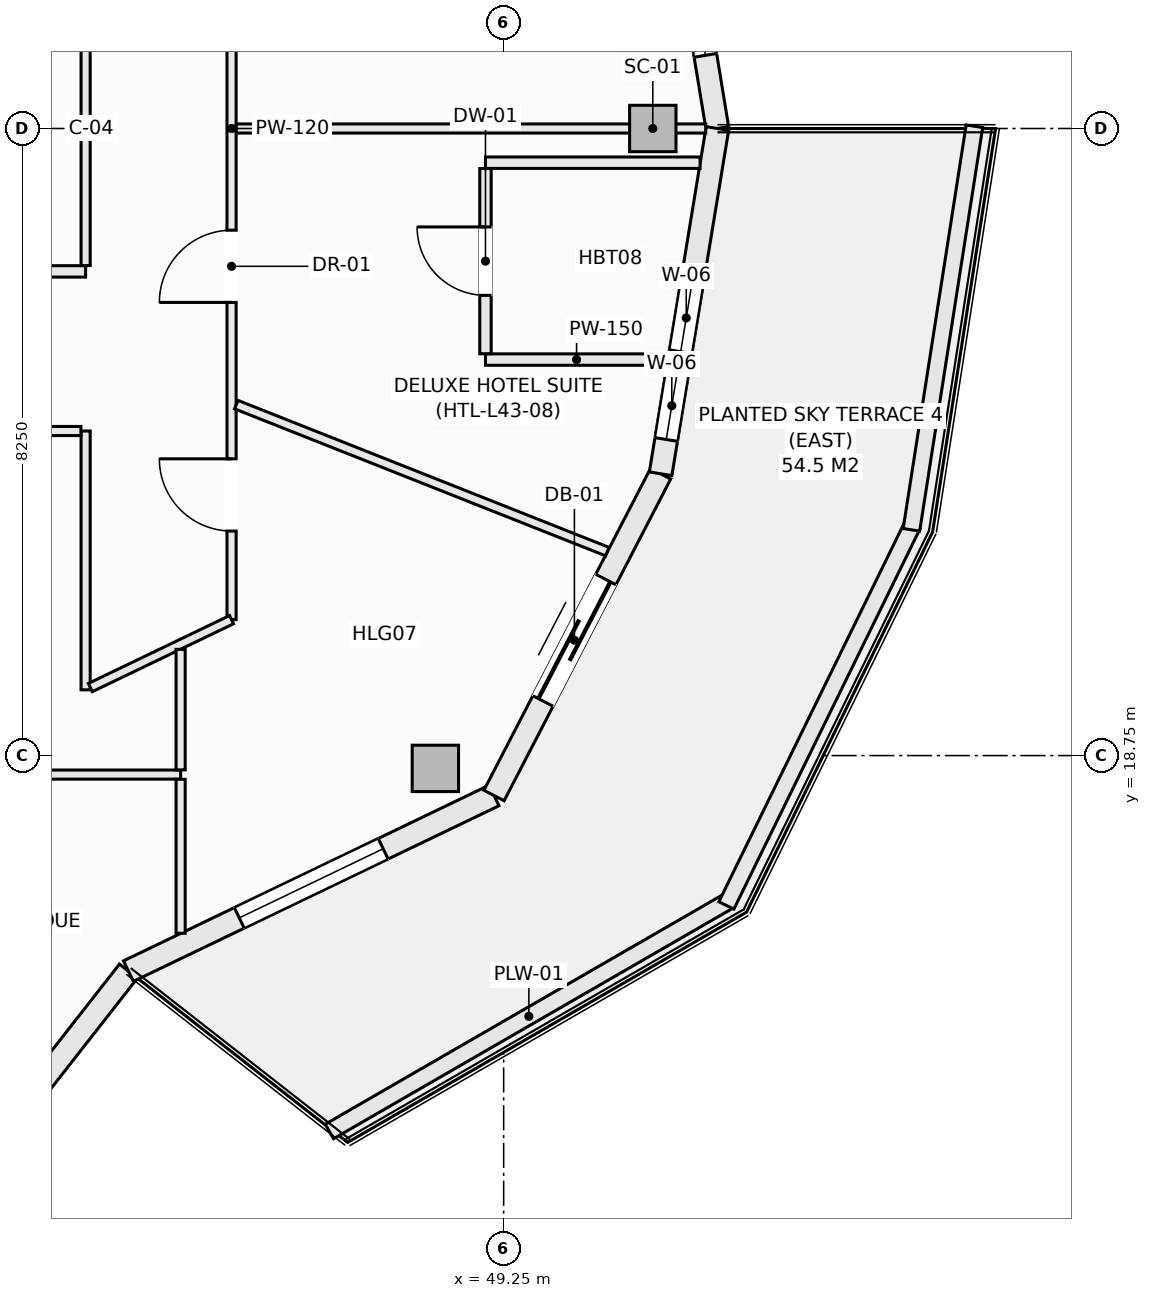
"""IFC4 building model, lengths in metres.
Left out: names, types, materials, properties, quantities, classifications, styles, units other than length and angle.
Written with IfcOpenShell. Run it as: python <this file> out.ifc"""

import sys

from ifc_helpers import new_model, si_unit, direction, frame, frame_2d, origin, origin_2d, place, context, subcontext, project, spatial, rectangle, hollow_rectangle, extrude, element, fill, save


model = new_model("IFC4")
c1 = context("Model", 3, precision=1e-05, world=origin(), true_north=direction((0.0, 1.0)))
c2 = subcontext(c1, "Body", "Model", "MODEL_VIEW")
j1 = project(units=[si_unit("LENGTHUNIT", "METRE"), si_unit("PLANEANGLEUNIT", "RADIAN")], contexts=[c1])
p1 = place(None, origin())
s1 = spatial("IfcSite", under=j1, at=p1, CompositionType="ELEMENT")
p2 = place(p1, origin())
s2 = spatial("IfcBuilding", under=s1, at=p2, CompositionType="ELEMENT")
p3 = place(p2, frame((0.0, 0.0, 166.5)))
s3 = spatial("IfcBuildingStorey", under=s2, at=p3, CompositionType="ELEMENT", Elevation=166.5)
for number, where, z_axis, x_axis in (
    (1, (51.212, 27.0, -0.27), (0.0, 0.0, 1.0), (1.0, 0.0, 0.0)),
    (2, (48.352, 18.581, -0.27), (0.0, 0.0, 1.0), (1.0, 0.0, 0.0)),
):
    element("IfcColumn", number, at=place(p3, frame(where, z_axis=z_axis, x_axis=x_axis)), inside=s3, PredefinedType="COLUMN", context=c2, shape_type="SweptSolid", body=[
        extrude(hollow_rectangle(XDim=0.61, YDim=0.61, WallThickness=0.025, at=origin_2d()), origin(), (0.0, 0.0, 1.0), 3.4),
    ])
p4 = place(p3, frame((51.315, 31.542, 0.0), z_axis=(0.0, 0.0, 1.0), x_axis=(0.162394765401, -0.986725868806, 0.0)))
e3 = element("IfcWall", 3, at=p4, inside=s3, PredefinedType="SOLIDWALL", context=c2, shape_type="SweptSolid", body=[
    extrude(rectangle(XDim=4.603, YDim=0.3, at=frame_2d((2.302, 0.0))), origin(), (0.0, 0.0, 1.0), 2.653),
])
p5 = place(p4, frame((0.958, 0.0, 0.74)))
e4 = element("IfcOpeningElement", 4, at=p5, cuts=e3, PredefinedType="OPENING", context=c2, shape_type="SweptSolid", body=[
    extrude(rectangle(XDim=1.2, YDim=1.7, at=frame_2d((0.6, 0.85))), frame((0.0, 0.16, 0.0), z_axis=(0.0, -1.0, 0.0), x_axis=(1.0, 0.0, 0.0)), (0.0, 0.0, 1.0), 0.32),
])
p6 = place(p4, frame((2.428, 0.0, 0.74)))
e5 = element("IfcOpeningElement", 5, at=p6, cuts=e3, PredefinedType="OPENING", context=c2, shape_type="SweptSolid", body=[
    extrude(rectangle(XDim=1.2, YDim=1.7, at=frame_2d((0.6, 0.85))), frame((0.0, 0.16, 0.0), z_axis=(0.0, -1.0, 0.0), x_axis=(1.0, 0.0, 0.0)), (0.0, 0.0, 1.0), 0.32),
])
p7 = place(p3, frame((41.094, 11.801, 0.0), z_axis=(0.0, 0.0, 1.0), x_axis=(0.616429245738, 0.787410302828, 0.0)))
e6 = element("IfcWall", 6, at=p7, inside=s3, PredefinedType="SOLIDWALL", context=c2, shape_type="SweptSolid", body=[
    extrude(rectangle(XDim=5.223, YDim=0.3, at=frame_2d((2.612, 0.0))), origin(), (0.0, 0.0, 1.0), 2.653),
])
p8 = place(p7, frame((1.38, 0.0, 0.72)))
e7 = element("IfcOpeningElement", 7, at=p8, cuts=e6, PredefinedType="OPENING", context=c2, shape_type="SweptSolid", body=[
    extrude(rectangle(XDim=1.2, YDim=1.65, at=frame_2d((0.6, 0.825))), frame((0.0, 0.16, 0.0), z_axis=(0.0, -1.0, 0.0), x_axis=(1.0, 0.0, 0.0)), (0.0, 0.0, 1.0), 0.32),
])
p9 = place(p3, frame((44.313, 15.914, 0.0), z_axis=(0.0, 0.0, 1.0), x_axis=(0.901353070301, 0.433085029363, 0.0)))
e8 = element("IfcWall", 8, at=p9, inside=s3, PredefinedType="SOLIDWALL", context=c2, shape_type="SweptSolid", body=[
    extrude(rectangle(XDim=5.336, YDim=0.3, at=frame_2d((2.668, 0.0))), origin(), (0.0, 0.0, 1.0), 2.653),
])
p10 = place(p9, frame((1.618, 0.0, 0.74)))
e9 = element("IfcOpeningElement", 9, at=p10, cuts=e8, PredefinedType="OPENING", context=c2, shape_type="SweptSolid", body=[
    extrude(rectangle(XDim=2.1, YDim=1.7, at=frame_2d((1.05, 0.85))), frame((0.0, 0.16, 0.0), z_axis=(0.0, -1.0, 0.0), x_axis=(1.0, 0.0, 0.0)), (0.0, 0.0, 1.0), 0.32),
])
p11 = place(p3, frame((49.123, 18.225, 0.0), z_axis=(0.0, 0.0, 1.0), x_axis=(0.459810251451, 0.888017191647, 0.0)))
e10 = element("IfcWall", 10, at=p11, inside=s3, PredefinedType="SOLIDWALL", context=c2, shape_type="SweptSolid", body=[
    extrude(rectangle(XDim=4.766, YDim=0.3, at=frame_2d((2.383, 0.0))), origin(), (0.0, 0.0, 1.0), 2.653),
])
p12 = place(p11, frame((1.4, 0.0, 0.0)))
e11 = element("IfcOpeningElement", 11, at=p12, cuts=e10, PredefinedType="OPENING", context=c2, shape_type="SweptSolid", body=[
    extrude(rectangle(XDim=1.8, YDim=2.25, at=frame_2d((0.9, 1.125))), frame((0.0, 0.16, 0.0), z_axis=(0.0, -1.0, 0.0), x_axis=(1.0, 0.0, 0.0)), (0.0, 0.0, 1.0), 0.32),
])
p13 = place(p3, frame((51.315, 22.458, 0.0), z_axis=(0.0, 0.0, 1.0), x_axis=(0.162394765401, 0.986725868806, 0.0)))
e12 = element("IfcWall", 12, at=p13, inside=s3, PredefinedType="SOLIDWALL", context=c2, shape_type="SweptSolid", body=[
    extrude(rectangle(XDim=4.603, YDim=0.3, at=frame_2d((2.302, 0.0))), origin(), (0.0, 0.0, 1.0), 2.653),
])
p14 = place(p13, frame((0.457, 0.0, 0.72)))
e13 = element("IfcOpeningElement", 13, at=p14, cuts=e12, PredefinedType="OPENING", context=c2, shape_type="SweptSolid", body=[
    extrude(rectangle(XDim=0.9, YDim=1.65, at=frame_2d((0.45, 0.825))), frame((0.0, 0.16, 0.0), z_axis=(0.0, -1.0, 0.0), x_axis=(1.0, 0.0, 0.0)), (0.0, 0.0, 1.0), 0.32),
])
p15 = place(p13, frame((1.627, 0.0, 0.72)))
e14 = element("IfcOpeningElement", 14, at=p15, cuts=e12, PredefinedType="OPENING", context=c2, shape_type="SweptSolid", body=[
    extrude(rectangle(XDim=0.9, YDim=1.65, at=frame_2d((0.45, 0.825))), frame((0.0, 0.16, 0.0), z_axis=(0.0, -1.0, 0.0), x_axis=(1.0, 0.0, 0.0)), (0.0, 0.0, 1.0), 0.32),
])
p16 = place(p3, frame((46.958, 13.805, 0.0), z_axis=(0.0, 0.0, 1.0), x_axis=(0.866058128659, 0.499943314571, 0.0)))
e15 = element("IfcWall", 15, at=p16, inside=s3, PredefinedType="PARAPET", context=c2, shape_type="SweptSolid", body=[
    extrude(rectangle(XDim=6.06, YDim=0.22, at=frame_2d((3.03, 0.0))), origin(), (0.0, 0.0, 1.0), 0.52),
])
p17 = place(p3, frame((52.18, 16.779, 0.0), z_axis=(0.0, 0.0, 1.0), x_axis=(0.439637174641, 0.898175458735, 0.0)))
e16 = element("IfcWall", 16, at=p17, inside=s3, PredefinedType="PARAPET", context=c2, shape_type="SweptSolid", body=[
    extrude(rectangle(XDim=5.567, YDim=0.22, at=frame_2d((2.784, 0.0))), origin(), (0.0, 0.0, 1.0), 0.52),
])
p18 = place(p3, frame((54.615, 21.72, 0.0), z_axis=(0.0, 0.0, 1.0), x_axis=(0.154245214003, 0.988032597619, 0.0)))
e17 = element("IfcWall", 17, at=p18, inside=s3, PredefinedType="PARAPET", context=c2, shape_type="SweptSolid", body=[
    extrude(rectangle(XDim=5.374, YDim=0.22, at=frame_2d((2.687, 0.0))), origin(), (0.0, 0.0, 1.0), 0.52),
])
p19 = place(p3, frame((49.011, 23.96, 0.0), z_axis=(0.0, 0.0, 1.0), x_axis=(1.0, 0.0, 0.0)))
e18 = element("IfcWall", 18, at=p19, inside=s3, PredefinedType="PARTITIONING", context=c2, shape_type="SweptSolid", body=[
    extrude(rectangle(XDim=2.397, YDim=0.15, at=frame_2d((1.199, 0.0))), origin(), (0.0, 0.0, 1.0), 3.13),
])
p20 = place(p3, frame((29.78, 25.12, 0.0), z_axis=(0.0, 0.0, 1.0), x_axis=(1.0, 0.0, 0.0)))
e19 = element("IfcWall", 19, at=p20, inside=s3, PredefinedType="PARTITIONING", context=c2, shape_type="SweptSolid", body=[
    extrude(rectangle(XDim=13.97, YDim=0.15, at=frame_2d((6.985, 0.0))), origin(), (0.0, 0.0, 1.0), 3.13),
])
p21 = place(p20, frame((3.14, 0.0, 0.0)))
e20 = element("IfcOpeningElement", 20, at=p21, cuts=e19, PredefinedType="OPENING", context=c2, shape_type="SweptSolid", body=[
    extrude(rectangle(XDim=0.95, YDim=2.1, at=frame_2d((0.475, 1.05))), frame((0.0, 0.085, 0.0), z_axis=(0.0, -1.0, 0.0), x_axis=(1.0, 0.0, 0.0)), (0.0, 0.0, 1.0), 0.17),
])
p22 = place(p20, frame((7.445, 0.0, 0.0)))
e21 = element("IfcOpeningElement", 21, at=p22, cuts=e19, PredefinedType="OPENING", context=c2, shape_type="SweptSolid", body=[
    extrude(rectangle(XDim=0.95, YDim=2.1, at=frame_2d((0.475, 1.05))), frame((0.0, 0.085, 0.0), z_axis=(0.0, -1.0, 0.0), x_axis=(1.0, 0.0, 0.0)), (0.0, 0.0, 1.0), 0.17),
])
p23 = place(p20, frame((10.815, 0.0, 0.0)))
e22 = element("IfcOpeningElement", 22, at=p23, cuts=e19, PredefinedType="OPENING", context=c2, shape_type="SweptSolid", body=[
    extrude(rectangle(XDim=0.95, YDim=2.1, at=frame_2d((0.475, 1.05))), frame((0.0, 0.085, 0.0), z_axis=(0.0, -1.0, 0.0), x_axis=(1.0, 0.0, 0.0)), (0.0, 0.0, 1.0), 0.17),
])
p24 = place(p3, frame((43.75, 19.615, 0.0), z_axis=(0.0, 0.0, 1.0), x_axis=(0.0, 1.0, 0.0)))
e23 = element("IfcWall", 23, at=p24, inside=s3, PredefinedType="PARTITIONING", context=c2, shape_type="SweptSolid", body=[
    extrude(rectangle(XDim=3.405, YDim=0.12, at=frame_2d((1.703, 0.0))), origin(), (0.0, 0.0, 1.0), 3.13),
])
p25 = place(p3, frame((43.75, 25.197, 0.0), z_axis=(0.0, 0.0, 1.0), x_axis=(0.0, 1.0, 0.0)))
e24 = element("IfcWall", 24, at=p25, inside=s3, PredefinedType="PARTITIONING", context=c2, shape_type="SweptSolid", body=[
    extrude(rectangle(XDim=3.646, YDim=0.12, at=frame_2d((1.823, 0.0))), origin(), (0.0, 0.0, 1.0), 3.13),
])
p26 = place(p3, frame((45.67, 20.538, 0.0), z_axis=(0.0, 0.0, 1.0), x_axis=(0.0, 1.0, 0.0)))
e25 = element("IfcWall", 25, at=p26, inside=s3, PredefinedType="PARTITIONING", context=c2, shape_type="SweptSolid", body=[
    extrude(rectangle(XDim=12.924, YDim=0.12, at=frame_2d((6.462, 0.0))), origin(), (0.0, 0.0, 1.0), 3.13),
])
p27 = place(p26, frame((1.166, 0.0, 0.0)))
e26 = element("IfcOpeningElement", 26, at=p27, cuts=e25, PredefinedType="OPENING", context=c2, shape_type="SweptSolid", body=[
    extrude(rectangle(XDim=0.95, YDim=2.1, at=frame_2d((0.475, 1.05))), frame((0.0, 0.07, 0.0), z_axis=(0.0, -1.0, 0.0), x_axis=(1.0, 0.0, 0.0)), (0.0, 0.0, 1.0), 0.14),
])
p28 = place(p26, frame((4.174, 0.0, 0.0)))
e27 = element("IfcOpeningElement", 27, at=p28, cuts=e25, PredefinedType="OPENING", context=c2, shape_type="SweptSolid", body=[
    extrude(rectangle(XDim=0.95, YDim=2.1, at=frame_2d((0.475, 1.05))), frame((0.0, 0.07, 0.0), z_axis=(0.0, -1.0, 0.0), x_axis=(1.0, 0.0, 0.0)), (0.0, 0.0, 1.0), 0.14),
])
p29 = place(p26, frame((7.8, 0.0, 0.0)))
e28 = element("IfcOpeningElement", 28, at=p29, cuts=e25, PredefinedType="OPENING", context=c2, shape_type="SweptSolid", body=[
    extrude(rectangle(XDim=0.95, YDim=2.1, at=frame_2d((0.475, 1.05))), frame((0.0, 0.07, 0.0), z_axis=(0.0, -1.0, 0.0), x_axis=(1.0, 0.0, 0.0)), (0.0, 0.0, 1.0), 0.14),
])
p30 = place(p26, frame((10.808, 0.0, 0.0)))
e29 = element("IfcOpeningElement", 29, at=p30, cuts=e25, PredefinedType="OPENING", context=c2, shape_type="SweptSolid", body=[
    extrude(rectangle(XDim=0.95, YDim=2.1, at=frame_2d((0.475, 1.05))), frame((0.0, 0.07, 0.0), z_axis=(0.0, -1.0, 0.0), x_axis=(1.0, 0.0, 0.0)), (0.0, 0.0, 1.0), 0.14),
])
p31 = place(p3, frame((43.812, 19.645, 0.0), z_axis=(0.0, 0.0, 1.0), x_axis=(0.901236415331, 0.433327732417, 0.0)))
e30 = element("IfcWall", 30, at=p31, inside=s3, PredefinedType="PARTITIONING", context=c2, shape_type="SweptSolid", body=[
    extrude(rectangle(XDim=2.062, YDim=0.12, at=frame_2d((1.031, 0.0))), origin(), (0.0, 0.0, 1.0), 3.13),
])
p32 = place(p3, frame((39.0, 23.02, 0.0), z_axis=(0.0, 0.0, 1.0), x_axis=(1.0, 0.0, 0.0)))
e31 = element("IfcWall", 31, at=p32, inside=s3, PredefinedType="PARTITIONING", context=c2, shape_type="SweptSolid", body=[
    extrude(rectangle(XDim=4.688, YDim=0.12, at=frame_2d((2.344, 0.0))), origin(), (0.0, 0.0, 1.0), 3.13),
])
p33 = place(p32, frame((0.609, 0.0, 0.0)))
e32 = element("IfcOpeningElement", 32, at=p33, cuts=e31, PredefinedType="OPENING", context=c2, shape_type="SweptSolid", body=[
    extrude(rectangle(XDim=0.95, YDim=2.1, at=frame_2d((0.475, 1.05))), frame((0.0, 0.07, 0.0), z_axis=(0.0, -1.0, 0.0), x_axis=(1.0, 0.0, 0.0)), (0.0, 0.0, 1.0), 0.14),
])
p34 = place(p3, frame((45.732, 27.0, 0.0), z_axis=(0.0, 0.0, 1.0), x_axis=(1.0, 0.0, 0.0)))
e33 = element("IfcWall", 33, at=p34, inside=s3, PredefinedType="PARTITIONING", context=c2, shape_type="SweptSolid", body=[
    extrude(rectangle(XDim=6.177, YDim=0.12, at=frame_2d((3.088, 0.0))), origin(), (0.0, 0.0, 1.0), 2.505),
])
p35 = place(p3, frame((39.02, 18.5, 0.0), z_axis=(0.0, 0.0, 1.0), x_axis=(1.0, 0.0, 0.0)))
e34 = element("IfcWall", 34, at=p35, inside=s3, PredefinedType="PARTITIONING", context=c2, shape_type="SweptSolid", body=[
    extrude(rectangle(XDim=5.98, YDim=0.12, at=frame_2d((2.99, 0.0))), origin(), (0.0, 0.0, 1.0), 2.812),
])
p36 = place(p3, frame((45.0, 16.413, 0.0), z_axis=(0.0, 0.0, 1.0), x_axis=(0.0, 1.0, 0.0)))
e35 = element("IfcWall", 35, at=p36, inside=s3, PredefinedType="PARTITIONING", context=c2, shape_type="SweptSolid", body=[
    extrude(rectangle(XDim=2.025, YDim=0.12, at=frame_2d((1.013, 0.0))), origin(), (0.0, 0.0, 1.0), 3.13),
])
p37 = place(p3, frame((45.0, 18.562, 0.0), z_axis=(0.0, 0.0, 1.0), x_axis=(0.0, 1.0, 0.0)))
e36 = element("IfcWall", 36, at=p37, inside=s3, PredefinedType="PARTITIONING", context=c2, shape_type="SweptSolid", body=[
    extrude(rectangle(XDim=1.585, YDim=0.12, at=frame_2d((0.792, 0.0))), origin(), (0.0, 0.0, 1.0), 3.13),
])
p38 = place(p3, frame((45.732, 23.367, 0.0), z_axis=(0.0, 0.0, 1.0), x_axis=(0.929706134606, -0.368302190158, 0.0)))
e37 = element("IfcWall", 37, at=p38, inside=s3, PredefinedType="PARTITIONING", context=c2, shape_type="SweptSolid", body=[
    extrude(rectangle(XDim=5.251, YDim=0.12, at=frame_2d((2.625, 0.0))), origin(), (0.0, 0.0, 1.0), 3.13),
])
p39 = place(p3, frame((49.011, 26.55, 0.0), z_axis=(0.0, 0.0, 1.0), x_axis=(1.0, 0.0, 0.0)))
e38 = element("IfcWall", 38, at=p39, inside=s3, PredefinedType="PARTITIONING", context=c2, shape_type="SweptSolid", body=[
    extrude(rectangle(XDim=2.823, YDim=0.15, at=frame_2d((1.412, 0.0))), origin(), (0.0, 0.0, 1.0), 3.13),
])
p40 = place(p3, frame((49.011, 24.037, 0.0), z_axis=(0.0, 0.0, 1.0), x_axis=(0.0, 1.0, 0.0)))
e39 = element("IfcWall", 39, at=p40, inside=s3, PredefinedType="PARTITIONING", context=c2, shape_type="SweptSolid", body=[
    extrude(rectangle(XDim=2.436, YDim=0.15, at=frame_2d((1.218, 0.0))), origin(), (0.0, 0.0, 1.0), 3.13),
])
p41 = place(p40, frame((0.768, 0.0, 0.0)))
e40 = element("IfcOpeningElement", 40, at=p41, cuts=e39, PredefinedType="OPENING", context=c2, shape_type="SweptSolid", body=[
    extrude(rectangle(XDim=0.9, YDim=2.1, at=frame_2d((0.45, 1.05))), frame((0.0, 0.085, 0.0), z_axis=(0.0, -1.0, 0.0), x_axis=(1.0, 0.0, 0.0)), (0.0, 0.0, 1.0), 0.17),
])
p42 = place(p10, origin())
e41 = element("IfcWindow", 41, at=p42, inside=s3, PartitioningType="SINGLE_PANEL", PredefinedType="WINDOW", context=c2, shape_type="SweptSolid", body=[
    extrude(rectangle(XDim=2.1, YDim=1.7, at=frame_2d((1.05, 0.85))), frame((0.0, 0.03, 0.0), z_axis=(0.0, -1.0, 0.0), x_axis=(1.0, 0.0, 0.0)), (0.0, 0.0, 1.0), 0.06),
])
fill(e9, e41)
p43 = place(p12, frame((1.8, 0.0, 0.0), z_axis=(0.0, 0.0, 1.0), x_axis=(-1.0, 0.0, 0.0)))
e42 = element("IfcDoor", 42, at=p43, inside=s3, OperationType="SLIDING_TO_LEFT", PredefinedType="DOOR", context=c2, shape_type="SweptSolid", body=[
    extrude(rectangle(XDim=1.8, YDim=2.25, at=frame_2d((0.9, 1.125))), frame((0.0, 0.025, 0.0), z_axis=(0.0, -1.0, 0.0), x_axis=(1.0, 0.0, 0.0)), (0.0, 0.0, 1.0), 0.05),
])
fill(e11, e42)
p44 = place(p14, origin())
e43 = element("IfcWindow", 43, at=p44, inside=s3, PartitioningType="SINGLE_PANEL", PredefinedType="WINDOW", context=c2, shape_type="SweptSolid", body=[
    extrude(rectangle(XDim=0.9, YDim=1.65, at=frame_2d((0.45, 0.825))), frame((0.0, 0.03, 0.0), z_axis=(0.0, -1.0, 0.0), x_axis=(1.0, 0.0, 0.0)), (0.0, 0.0, 1.0), 0.06),
])
fill(e13, e43)
p45 = place(p27, origin())
e44 = element("IfcDoor", 44, at=p45, inside=s3, OperationType="SINGLE_SWING_RIGHT", PredefinedType="DOOR", context=c2, shape_type="SweptSolid", body=[
    extrude(rectangle(XDim=0.95, YDim=2.1, at=frame_2d((0.475, 1.05))), frame((0.0, 0.025, 0.0), z_axis=(0.0, -1.0, 0.0), x_axis=(1.0, 0.0, 0.0)), (0.0, 0.0, 1.0), 0.05),
])
fill(e26, e44)
p46 = place(p28, origin())
e45 = element("IfcDoor", 45, at=p46, inside=s3, OperationType="SINGLE_SWING_LEFT", PredefinedType="DOOR", context=c2, shape_type="SweptSolid", body=[
    extrude(rectangle(XDim=0.95, YDim=2.1, at=frame_2d((0.475, 1.05))), frame((0.0, 0.025, 0.0), z_axis=(0.0, -1.0, 0.0), x_axis=(1.0, 0.0, 0.0)), (0.0, 0.0, 1.0), 0.05),
])
fill(e27, e45)
p47 = place(p41, origin())
e46 = element("IfcDoor", 46, at=p47, inside=s3, OperationType="SINGLE_SWING_RIGHT", PredefinedType="DOOR", context=c2, shape_type="SweptSolid", body=[
    extrude(rectangle(XDim=0.9, YDim=2.1, at=frame_2d((0.45, 1.05))), frame((0.0, 0.025, 0.0), z_axis=(0.0, -1.0, 0.0), x_axis=(1.0, 0.0, 0.0)), (0.0, 0.0, 1.0), 0.05),
])
fill(e40, e46)
p48 = place(p6, origin())
e47 = element("IfcWindow", 47, at=p48, inside=s3, PartitioningType="SINGLE_PANEL", PredefinedType="WINDOW", context=c2, shape_type="SweptSolid", body=[
    extrude(rectangle(XDim=1.2, YDim=1.7, at=frame_2d((0.6, 0.85))), frame((0.0, 0.03, 0.0), z_axis=(0.0, -1.0, 0.0), x_axis=(1.0, 0.0, 0.0)), (0.0, 0.0, 1.0), 0.06),
])
fill(e5, e47)
p49 = place(p15, origin())
e48 = element("IfcWindow", 48, at=p49, inside=s3, PartitioningType="SINGLE_PANEL", PredefinedType="WINDOW", context=c2, shape_type="SweptSolid", body=[
    extrude(rectangle(XDim=0.9, YDim=1.65, at=frame_2d((0.45, 0.825))), frame((0.0, 0.03, 0.0), z_axis=(0.0, -1.0, 0.0), x_axis=(1.0, 0.0, 0.0)), (0.0, 0.0, 1.0), 0.06),
])
fill(e14, e48)
save(model, sys.argv[1])
